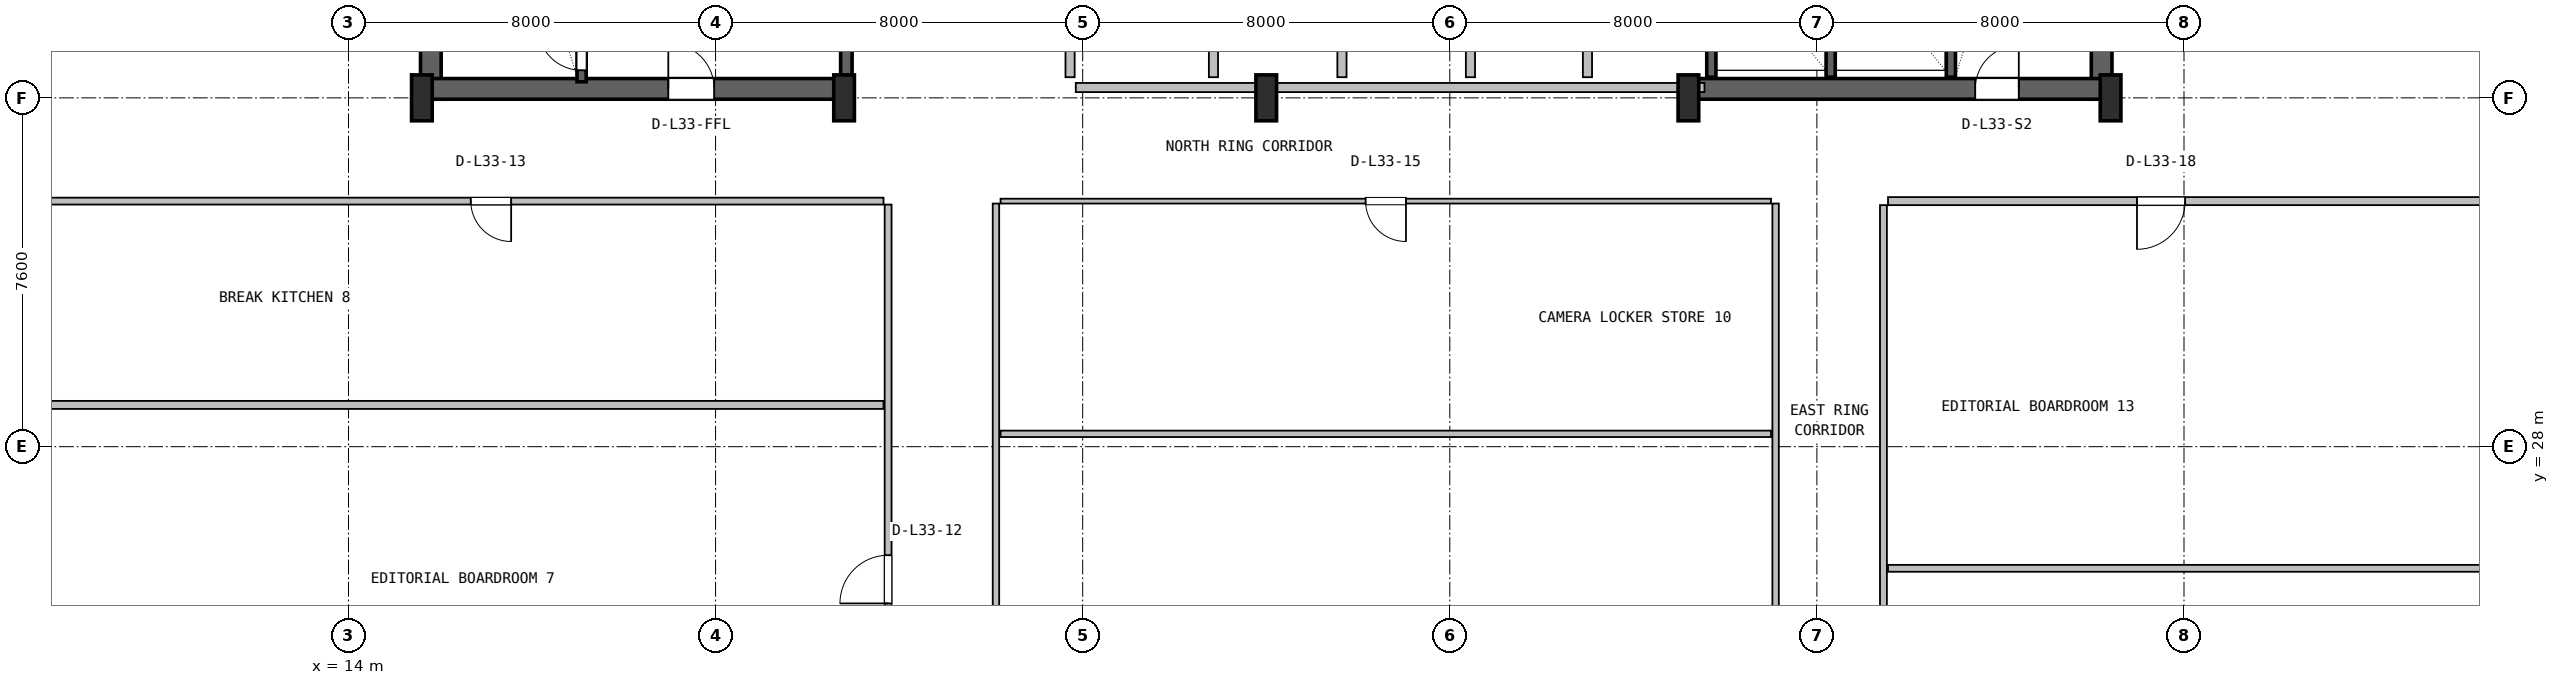
"""IFC4 building model, lengths in metres.
Left out: names, types, materials, properties, quantities, classifications, styles, units other than length and angle.
Written with IfcOpenShell. Run it as: python <this file> out.ifc"""

import sys

from ifc_helpers import new_model, si_unit, direction, frame, frame_2d, origin, origin_2d, place, context, subcontext, project, spatial, rectangle, i_section, extrude, source, transform, mapped, element, fill, save


model = new_model("IFC4")
c1 = context("Model", 3, precision=1e-05, world=origin(), true_north=direction((0.0, 1.0)))
c2 = subcontext(c1, "Body", "Model", "MODEL_VIEW")
j1 = project(units=[si_unit("LENGTHUNIT", "METRE"), si_unit("PLANEANGLEUNIT", "RADIAN")], contexts=[c1])
p1 = place(None, origin())
s1 = spatial("IfcSite", under=j1, at=p1, CompositionType="ELEMENT")
p2 = place(p1, origin())
s2 = spatial("IfcBuilding", under=s1, at=p2, CompositionType="ELEMENT")
p3 = place(p2, frame((0.0, 0.0, 137.2)))
s3 = spatial("IfcBuildingStorey", under=s2, at=p3, CompositionType="ELEMENT", Elevation=137.2)
for number, where, z_axis, x_axis in (
    (1, (15.795, 35.57, 0.0), (0.0, 0.0, 1.0), (0.0, 1.0, 0.0)),
    (2, (52.205, 35.57, 0.0), (0.0, 0.0, 1.0), (0.0, 1.0, 0.0)),
):
    element("IfcWall", number, at=place(p3, frame(where, z_axis=z_axis, x_axis=x_axis)), inside=s3, PredefinedType="SHEAR", context=c2, shape_type="SweptSolid", body=[
        extrude(rectangle(XDim=11.23, YDim=0.45, at=frame_2d((5.615, 0.0))), origin(), (0.0, 0.0, 1.0), 3.48),
    ])
p4 = place(p3, frame((15.57, 35.795, 0.0), z_axis=(0.0, 0.0, 1.0), x_axis=(1.0, 0.0, 0.0)))
e3 = element("IfcWall", 3, at=p4, inside=s3, PredefinedType="SHEAR", context=c2, shape_type="SweptSolid", body=[
    extrude(rectangle(XDim=9.23, YDim=0.45, at=frame_2d((4.615, 0.0))), origin(), (0.0, 0.0, 1.0), 3.48),
])
p5 = place(p4, frame((5.4, 0.0, 0.0)))
e4 = element("IfcOpeningElement", 4, at=p5, cuts=e3, PredefinedType="OPENING", context=c2, shape_type="SweptSolid", body=[
    extrude(rectangle(XDim=1.0, YDim=2.1, at=frame_2d((0.5, 1.05))), frame((0.0, 0.235, 0.0), z_axis=(0.0, -1.0, 0.0), x_axis=(1.0, 0.0, 0.0)), (0.0, 0.0, 1.0), 0.47),
])
p6 = place(p3, frame((43.2, 35.795, 0.0), z_axis=(0.0, 0.0, 1.0), x_axis=(1.0, 0.0, 0.0)))
e5 = element("IfcWall", 5, at=p6, inside=s3, PredefinedType="SHEAR", context=c2, shape_type="SweptSolid", body=[
    extrude(rectangle(XDim=9.23, YDim=0.45, at=frame_2d((4.615, 0.0))), origin(), (0.0, 0.0, 1.0), 3.48),
])
p7 = place(p6, frame((6.25, 0.0, 0.0)))
e6 = element("IfcOpeningElement", 6, at=p7, cuts=e5, PredefinedType="OPENING", context=c2, shape_type="SweptSolid", body=[
    extrude(rectangle(XDim=0.95, YDim=2.1, at=frame_2d((0.475, 1.05))), frame((0.0, 0.235, 0.0), z_axis=(0.0, -1.0, 0.0), x_axis=(1.0, 0.0, 0.0)), (0.0, 0.0, 1.0), 0.47),
])
m1 = source(origin(), c2, "Body", "SweptSolid", [
    extrude(i_section(OverallWidth=0.45, OverallDepth=1.0, WebThickness=0.016, FlangeThickness=0.03, FilletRadius=0.016, at=origin_2d()), origin(), (0.0, 0.0, 1.0), 3.8),
])
for number, where, z_axis, x_axis in (
    (7, (15.6, 35.6, 0.0), (0.0, 0.0, 1.0), (1.0, 0.0, 0.0)),
    (8, (24.8, 35.6, 0.0), (0.0, 0.0, 1.0), (1.0, 0.0, 0.0)),
    (9, (34.0, 35.6, 0.0), (0.0, 0.0, 1.0), (1.0, 0.0, 0.0)),
    (10, (43.2, 35.6, 0.0), (0.0, 0.0, 1.0), (1.0, 0.0, 0.0)),
    (11, (52.4, 35.6, 0.0), (0.0, 0.0, 1.0), (1.0, 0.0, 0.0)),
):
    element("IfcColumn", number, at=place(p3, frame(where, z_axis=z_axis, x_axis=x_axis)), inside=s3, PredefinedType="COLUMN", context=c2, shape_type="MappedRepresentation", body=[
        mapped(m1, transform((0.0, 0.0, 0.0), x_axis=(1.0, 0.0, 0.0), y_axis=(0.0, 1.0, 0.0), z_axis=(0.0, 0.0, 1.0), scale=1.0)),
    ])
p8 = place(p3, frame((19.08, 35.95, 0.0), z_axis=(0.0, 0.0, 1.0), x_axis=(0.0, 1.0, 0.0)))
e12 = element("IfcWall", 12, at=p8, inside=s3, PredefinedType="SHEAR", context=c2, shape_type="SweptSolid", body=[
    extrude(rectangle(XDim=9.65, YDim=0.2, at=frame_2d((4.825, 0.0))), origin(), (0.0, 0.0, 1.0), 3.48),
])
p9 = place(p8, frame((0.25, 0.0, 0.0)))
e13 = element("IfcOpeningElement", 13, at=p9, cuts=e12, PredefinedType="OPENING", context=c2, shape_type="SweptSolid", body=[
    extrude(rectangle(XDim=0.95, YDim=2.1, at=frame_2d((0.475, 1.05))), frame((0.0, 0.11, 0.0), z_axis=(0.0, -1.0, 0.0), x_axis=(1.0, 0.0, 0.0)), (0.0, 0.0, 1.0), 0.22),
])
p10 = place(p3, frame((24.85, 36.05, 0.0), z_axis=(0.0, 0.0, 1.0), x_axis=(0.0, 1.0, 0.0)))
e14 = element("IfcWall", 14, at=p10, inside=s3, PredefinedType="SHEAR", context=c2, shape_type="SweptSolid", body=[
    extrude(rectangle(XDim=10.45, YDim=0.25, at=frame_2d((5.225, 0.0))), origin(), (0.0, 0.0, 1.0), 3.48),
])
p11 = place(p3, frame((48.92, 36.05, 0.0), z_axis=(0.0, 0.0, 1.0), x_axis=(0.0, 1.0, 0.0)))
e15 = element("IfcWall", 15, at=p11, inside=s3, PredefinedType="SHEAR", context=c2, shape_type="SweptSolid", body=[
    extrude(rectangle(XDim=10.5, YDim=0.2, at=frame_2d((5.25, 0.0))), origin(), (0.0, 0.0, 1.0), 3.48),
])
for number, where, z_axis, x_axis in (
    (16, (43.7, 36.05, 0.0), (0.0, 0.0, 1.0), (0.0, 1.0, 0.0)),
    (17, (46.3, 36.05, 0.0), (0.0, 0.0, 1.0), (0.0, 1.0, 0.0)),
):
    element("IfcWall", number, at=place(p3, frame(where, z_axis=z_axis, x_axis=x_axis)), inside=s3, PredefinedType="SHEAR", context=c2, shape_type="SweptSolid", body=[
        extrude(rectangle(XDim=3.05, YDim=0.2, at=frame_2d((1.525, 0.0))), origin(), (0.0, 0.0, 1.0), 3.48),
    ])
p12 = place(p3, frame((29.85, 35.825, 0.0), z_axis=(0.0, 0.0, 1.0), x_axis=(1.0, 0.0, 0.0)))
e18 = element("IfcWall", 18, at=p12, inside=s3, PredefinedType="SOLIDWALL", context=c2, shape_type="SweptSolid", body=[
    extrude(rectangle(XDim=13.7, YDim=0.2, at=frame_2d((6.85, 0.0))), origin(), (0.0, 0.0, 1.0), 2.255),
])
for number, where, z_axis, x_axis in (
    (19, (32.85, 36.05, 0.0), (0.0, 0.0, 1.0), (0.0, 1.0, 0.0)),
    (20, (29.725, 36.05, 0.0), (0.0, 0.0, 1.0), (0.0, 1.0, 0.0)),
    (21, (35.65, 36.05, 0.0), (0.0, 0.0, 1.0), (0.0, 1.0, 0.0)),
    (22, (38.45, 36.05, 0.0), (0.0, 0.0, 1.0), (0.0, 1.0, 0.0)),
):
    element("IfcWall", number, at=place(p3, frame(where, z_axis=z_axis, x_axis=x_axis)), inside=s3, PredefinedType="PLUMBINGWALL", context=c2, shape_type="SweptSolid", body=[
        extrude(rectangle(XDim=3.1, YDim=0.2, at=frame_2d((1.55, 0.0))), origin(), (0.0, 0.0, 1.0), 3.46),
    ])
p13 = place(p3, frame((41.0, 36.05, 0.0), z_axis=(0.0, 0.0, 1.0), x_axis=(0.0, 1.0, 0.0)))
e23 = element("IfcWall", 23, at=p13, inside=s3, PredefinedType="SOLIDWALL", context=c2, shape_type="SweptSolid", body=[
    extrude(rectangle(XDim=3.1, YDim=0.2, at=frame_2d((1.55, 0.0))), origin(), (0.0, 0.0, 1.0), 3.46),
])
p14 = place(p3, frame((25.76, 15.178, 0.0), z_axis=(0.0, 0.0, 1.0), x_axis=(0.0, 1.0, 0.0)))
e24 = element("IfcWall", 24, at=p14, inside=s3, PredefinedType="PARTITIONING", context=c2, shape_type="SweptSolid", body=[
    extrude(rectangle(XDim=18.097, YDim=0.15, at=frame_2d((9.048, 0.0))), origin(), (0.0, 0.0, 1.0), 2.76),
])
p15 = place(p14, frame((2.512, 0.0, 0.0)))
e25 = element("IfcOpeningElement", 25, at=p15, cuts=e24, PredefinedType="OPENING", context=c2, shape_type="SweptSolid", body=[
    extrude(rectangle(XDim=0.92, YDim=2.08, at=frame_2d((0.46, 1.04))), frame((0.0, 0.085, 0.0), z_axis=(0.0, -1.0, 0.0), x_axis=(1.0, 0.0, 0.0)), (0.0, 0.0, 1.0), 0.17),
])
p16 = place(p14, frame((9.407, 0.0, 0.0)))
e26 = element("IfcOpeningElement", 26, at=p16, cuts=e24, PredefinedType="OPENING", context=c2, shape_type="SweptSolid", body=[
    extrude(rectangle(XDim=1.05, YDim=2.1, at=frame_2d((0.525, 1.05))), frame((0.0, 0.085, 0.0), z_axis=(0.0, -1.0, 0.0), x_axis=(1.0, 0.0, 0.0)), (0.0, 0.0, 1.0), 0.17),
])
p17 = place(p3, frame((4.68, 28.91, 0.0), z_axis=(0.0, 0.0, 1.0), x_axis=(1.0, 0.0, 0.0)))
e27 = element("IfcWall", 27, at=p17, inside=s3, PredefinedType="PARTITIONING", context=c2, shape_type="SweptSolid", body=[
    extrude(rectangle(XDim=20.98, YDim=0.175, at=frame_2d((10.49, 0.0))), origin(), (0.0, 0.0, 1.0), 2.76),
])
p18 = place(p3, frame((4.68, 33.35, 0.0), z_axis=(0.0, 0.0, 1.0), x_axis=(1.0, 0.0, 0.0)))
e28 = element("IfcWall", 28, at=p18, inside=s3, PredefinedType="PARTITIONING", context=c2, shape_type="SweptSolid", body=[
    extrude(rectangle(XDim=20.98, YDim=0.15, at=frame_2d((10.49, 0.0))), origin(), (0.0, 0.0, 1.0), 2.76),
])
p19 = place(p18, frame((11.985, 0.0, 0.0)))
e29 = element("IfcOpeningElement", 29, at=p19, cuts=e28, PredefinedType="OPENING", context=c2, shape_type="SweptSolid", body=[
    extrude(rectangle(XDim=0.88, YDim=2.06, at=frame_2d((0.44, 1.03))), frame((0.0, 0.085, 0.0), z_axis=(0.0, -1.0, 0.0), x_axis=(1.0, 0.0, 0.0)), (0.0, 0.0, 1.0), 0.17),
])
p20 = place(p3, frame((45.1, 17.51, 0.0), z_axis=(0.0, 0.0, 1.0), x_axis=(0.0, 1.0, 0.0)))
e30 = element("IfcWall", 30, at=p20, inside=s3, PredefinedType="PARTITIONING", context=c2, shape_type="SweptSolid", body=[
    extrude(rectangle(XDim=15.787, YDim=0.14, at=frame_2d((7.894, 0.0))), origin(), (0.0, 0.0, 1.0), 3.152),
])
p21 = place(p3, frame((28.21, 28.28, 0.0), z_axis=(0.0, 0.0, 1.0), x_axis=(1.0, 0.0, 0.0)))
e31 = element("IfcWall", 31, at=p21, inside=s3, PredefinedType="PARTITIONING", context=c2, shape_type="SweptSolid", body=[
    extrude(rectangle(XDim=16.79, YDim=0.14, at=frame_2d((8.395, 0.0))), origin(), (0.0, 0.0, 1.0), 2.76),
])
p22 = place(p3, frame((28.11, 17.51, 0.0), z_axis=(0.0, 0.0, 1.0), x_axis=(0.0, 1.0, 0.0)))
e32 = element("IfcWall", 32, at=p22, inside=s3, PredefinedType="PARTITIONING", context=c2, shape_type="SweptSolid", body=[
    extrude(rectangle(XDim=15.787, YDim=0.14, at=frame_2d((7.894, 0.0))), origin(), (0.0, 0.0, 1.0), 2.76),
])
p23 = place(p3, frame((28.21, 33.35, 0.0), z_axis=(0.0, 0.0, 1.0), x_axis=(1.0, 0.0, 0.0)))
e33 = element("IfcWall", 33, at=p23, inside=s3, PredefinedType="PARTITIONING", context=c2, shape_type="SweptSolid", body=[
    extrude(rectangle(XDim=16.79, YDim=0.105, at=frame_2d((8.395, 0.0))), origin(), (0.0, 0.0, 1.0), 2.76),
])
p24 = place(p23, frame((7.955, 0.0, 0.0)))
e34 = element("IfcOpeningElement", 34, at=p24, cuts=e33, PredefinedType="OPENING", context=c2, shape_type="SweptSolid", body=[
    extrude(rectangle(XDim=0.88, YDim=2.06, at=frame_2d((0.44, 1.03))), frame((0.0, 0.062, 0.0), z_axis=(0.0, -1.0, 0.0), x_axis=(1.0, 0.0, 0.0)), (0.0, 0.0, 1.0), 0.125),
])
p25 = place(p3, frame((47.45, 15.178, 0.0), z_axis=(0.0, 0.0, 1.0), x_axis=(0.0, 1.0, 0.0)))
e35 = element("IfcWall", 35, at=p25, inside=s3, PredefinedType="PARTITIONING", context=c2, shape_type="SweptSolid", body=[
    extrude(rectangle(XDim=18.085, YDim=0.15, at=frame_2d((9.042, 0.0))), origin(), (0.0, 0.0, 1.0), 3.152),
])
p26 = place(p25, frame((1.622, 0.0, 0.0)))
e36 = element("IfcOpeningElement", 36, at=p26, cuts=e35, PredefinedType="OPENING", context=c2, shape_type="SweptSolid", body=[
    extrude(rectangle(XDim=0.92, YDim=2.08, at=frame_2d((0.46, 1.04))), frame((0.0, 0.085, 0.0), z_axis=(0.0, -1.0, 0.0), x_axis=(1.0, 0.0, 0.0)), (0.0, 0.0, 1.0), 0.17),
])
p27 = place(p25, frame((6.802, 0.0, 0.0)))
e37 = element("IfcOpeningElement", 37, at=p27, cuts=e35, PredefinedType="OPENING", context=c2, shape_type="SweptSolid", body=[
    extrude(rectangle(XDim=0.92, YDim=2.08, at=frame_2d((0.46, 1.04))), frame((0.0, 0.085, 0.0), z_axis=(0.0, -1.0, 0.0), x_axis=(1.0, 0.0, 0.0)), (0.0, 0.0, 1.0), 0.17),
])
p28 = place(p3, frame((47.55, 25.35, 0.0), z_axis=(0.0, 0.0, 1.0), x_axis=(1.0, 0.0, 0.0)))
e38 = element("IfcWall", 38, at=p28, inside=s3, PredefinedType="PARTITIONING", context=c2, shape_type="SweptSolid", body=[
    extrude(rectangle(XDim=15.77, YDim=0.15, at=frame_2d((7.885, 0.0))), origin(), (0.0, 0.0, 1.0), 3.038),
])
p29 = place(p3, frame((47.55, 33.35, 0.0), z_axis=(0.0, 0.0, 1.0), x_axis=(1.0, 0.0, 0.0)))
e39 = element("IfcWall", 39, at=p29, inside=s3, PredefinedType="PARTITIONING", context=c2, shape_type="SweptSolid", body=[
    extrude(rectangle(XDim=15.77, YDim=0.175, at=frame_2d((7.885, 0.0))), origin(), (0.0, 0.0, 1.0), 3.038),
])
p30 = place(p29, frame((5.425, 0.0, 0.0)))
e40 = element("IfcOpeningElement", 40, at=p30, cuts=e39, PredefinedType="OPENING", context=c2, shape_type="SweptSolid", body=[
    extrude(rectangle(XDim=1.05, YDim=2.1, at=frame_2d((0.525, 1.05))), frame((0.0, 0.098, 0.0), z_axis=(0.0, -1.0, 0.0), x_axis=(1.0, 0.0, 0.0)), (0.0, 0.0, 1.0), 0.195),
])
m2 = source(origin(), c2, "Body", "SweptSolid", [
    extrude(rectangle(XDim=0.95, YDim=2.1, at=frame_2d((0.475, 1.05))), frame((0.0, 0.025, 0.0), z_axis=(0.0, -1.0, 0.0), x_axis=(1.0, 0.0, 0.0)), (0.0, 0.0, 1.0), 0.05),
])
p31 = place(p9, origin())
e41 = element("IfcDoor", 41, at=p31, inside=s3, OperationType="SINGLE_SWING_RIGHT", PredefinedType="DOOR", context=c2, shape_type="MappedRepresentation", body=[
    mapped(m2, transform((0.0, 0.0, 0.0), x_axis=(1.0, 0.0, 0.0), y_axis=(0.0, 1.0, 0.0), z_axis=(0.0, 0.0, 1.0), scale=1.0)),
])
fill(e13, e41)
m3 = source(origin(), c2, "Body", "SweptSolid", [
    extrude(rectangle(XDim=1.0, YDim=2.1, at=frame_2d((0.5, 1.05))), frame((0.0, 0.025, 0.0), z_axis=(0.0, -1.0, 0.0), x_axis=(1.0, 0.0, 0.0)), (0.0, 0.0, 1.0), 0.05),
])
p32 = place(p5, origin())
e42 = element("IfcDoor", 42, at=p32, inside=s3, OperationType="SINGLE_SWING_LEFT", PredefinedType="DOOR", context=c2, shape_type="MappedRepresentation", body=[
    mapped(m3, transform((0.0, 0.0, 0.0), x_axis=(1.0, 0.0, 0.0), y_axis=(0.0, 1.0, 0.0), z_axis=(0.0, 0.0, 1.0), scale=1.0)),
])
fill(e4, e42)
p33 = place(p7, origin())
e43 = element("IfcDoor", 43, at=p33, inside=s3, OperationType="SINGLE_SWING_RIGHT", PredefinedType="DOOR", context=c2, shape_type="MappedRepresentation", body=[
    mapped(m2, transform((0.0, 0.0, 0.0), x_axis=(1.0, 0.0, 0.0), y_axis=(0.0, 1.0, 0.0), z_axis=(0.0, 0.0, 1.0), scale=1.0)),
])
fill(e6, e43)
m4 = source(origin(), c2, "Body", "SweptSolid", [
    extrude(rectangle(XDim=1.05, YDim=2.1, at=frame_2d((0.525, 1.05))), frame((0.0, 0.025, 0.0), z_axis=(0.0, -1.0, 0.0), x_axis=(1.0, 0.0, 0.0)), (0.0, 0.0, 1.0), 0.05),
])
p34 = place(p16, origin())
e44 = element("IfcDoor", 44, at=p34, inside=s3, OperationType="SINGLE_SWING_LEFT", PredefinedType="DOOR", context=c2, shape_type="MappedRepresentation", body=[
    mapped(m4, transform((0.0, 0.0, 0.0), x_axis=(1.0, 0.0, 0.0), y_axis=(0.0, 1.0, 0.0), z_axis=(0.0, 0.0, 1.0), scale=1.0)),
])
fill(e26, e44)
m5 = source(origin(), c2, "Body", "SweptSolid", [
    extrude(rectangle(XDim=0.88, YDim=2.06, at=frame_2d((0.44, 1.03))), frame((0.0, 0.025, 0.0), z_axis=(0.0, -1.0, 0.0), x_axis=(1.0, 0.0, 0.0)), (0.0, 0.0, 1.0), 0.05),
])
p35 = place(p19, frame((0.88, 0.0, 0.0), z_axis=(0.0, 0.0, 1.0), x_axis=(-1.0, 0.0, 0.0)))
e45 = element("IfcDoor", 45, at=p35, inside=s3, OperationType="SINGLE_SWING_RIGHT", PredefinedType="DOOR", context=c2, shape_type="MappedRepresentation", body=[
    mapped(m5, transform((0.0, 0.0, 0.0), x_axis=(1.0, 0.0, 0.0), y_axis=(0.0, 1.0, 0.0), z_axis=(0.0, 0.0, 1.0), scale=1.0)),
])
fill(e29, e45)
p36 = place(p24, frame((0.88, 0.0, 0.0), z_axis=(0.0, 0.0, 1.0), x_axis=(-1.0, 0.0, 0.0)))
e46 = element("IfcDoor", 46, at=p36, inside=s3, OperationType="SINGLE_SWING_RIGHT", PredefinedType="DOOR", context=c2, shape_type="MappedRepresentation", body=[
    mapped(m5, transform((0.0, 0.0, 0.0), x_axis=(1.0, 0.0, 0.0), y_axis=(0.0, 1.0, 0.0), z_axis=(0.0, 0.0, 1.0), scale=1.0)),
])
fill(e34, e46)
p37 = place(p30, frame((1.05, 0.0, 0.0), z_axis=(0.0, 0.0, 1.0), x_axis=(-1.0, 0.0, 0.0)))
e47 = element("IfcDoor", 47, at=p37, inside=s3, OperationType="SINGLE_SWING_LEFT", PredefinedType="DOOR", context=c2, shape_type="MappedRepresentation", body=[
    mapped(m4, transform((0.0, 0.0, 0.0), x_axis=(1.0, 0.0, 0.0), y_axis=(0.0, 1.0, 0.0), z_axis=(0.0, 0.0, 1.0), scale=1.0)),
])
fill(e40, e47)
save(model, sys.argv[1])
